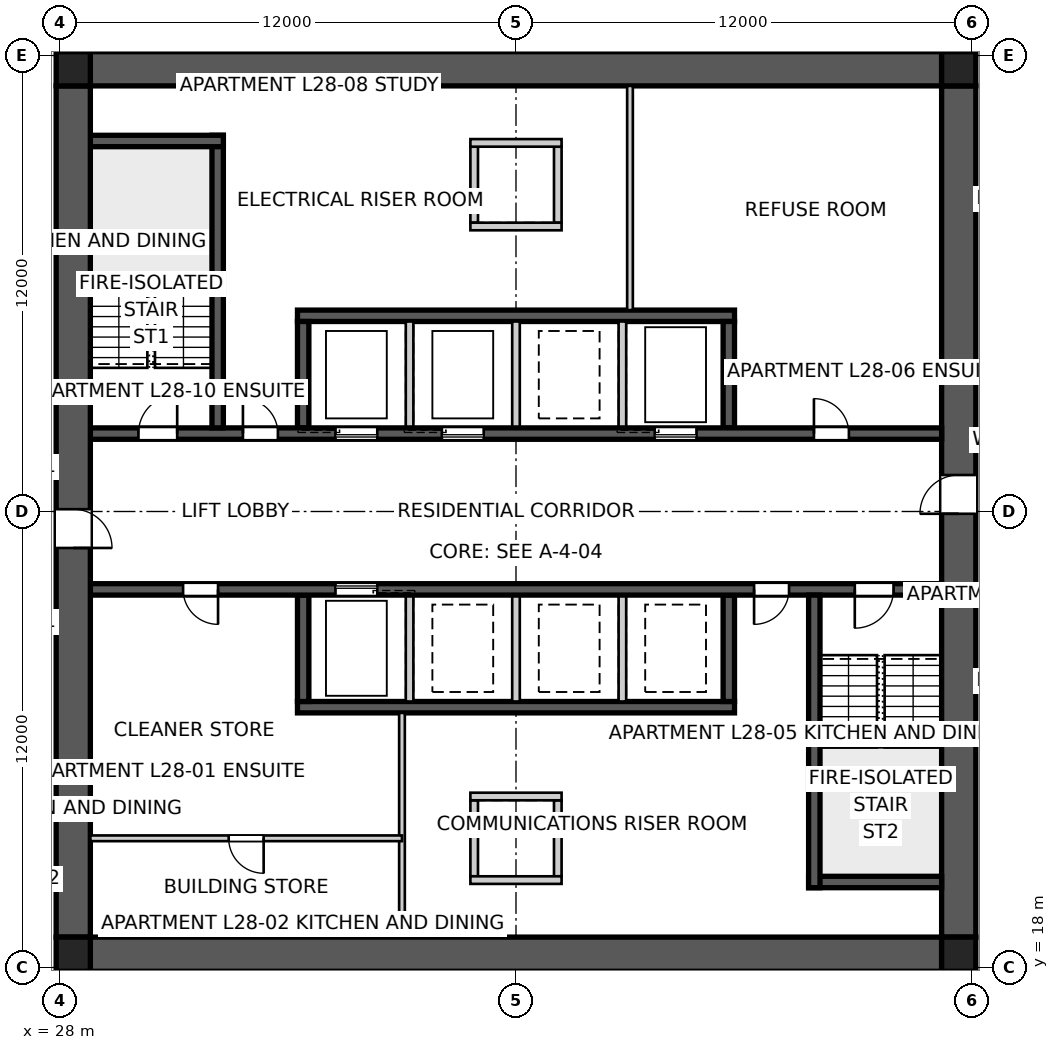
"""IFC4 building model, lengths in metres.
Left out: names, types, materials, properties, quantities, classifications, styles, units other than length and angle.
Written with IfcOpenShell. Run it as: python <this file> out.ifc"""

import sys

from ifc_helpers import new_model, si_unit, direction, frame, frame_2d, origin, origin_2d, place, context, subcontext, project, spatial, polyline, rectangle, outline, extrude, element, fill, save


model = new_model("IFC4")
c1 = context("Model", 3, precision=1e-05, world=origin(), true_north=direction((0.0, 1.0)))
c2 = subcontext(c1, "Body", "Model", "MODEL_VIEW")
j1 = project(units=[si_unit("LENGTHUNIT", "METRE"), si_unit("PLANEANGLEUNIT", "RADIAN")], contexts=[c1])
p1 = place(None, origin())
s1 = spatial("IfcSite", under=j1, at=p1, CompositionType="ELEMENT")
p2 = place(p1, origin())
s2 = spatial("IfcBuilding", under=s1, at=p2, CompositionType="ELEMENT")
p3 = place(p2, frame((0.0, 0.0, 103.2)))
s3 = spatial("IfcBuildingStorey", under=s2, at=p3, CompositionType="ELEMENT", Elevation=103.2)
for number, where, z_axis, x_axis in (
    (1, (28.8, 41.65, 0.0), (0.0, 0.0, 1.0), (1.0, 0.0, 0.0)),
    (2, (51.2, 18.35, 0.0), (0.0, 0.0, 1.0), (-1.0, 0.0, 0.0)),
):
    element("IfcWall", number, at=place(p3, frame(where, z_axis=z_axis, x_axis=x_axis)), inside=s3, PredefinedType="SHEAR", context=c2, shape_type="SweptSolid", body=[
        extrude(outline(polyline([(0.0, -0.45), (22.4, -0.45), (22.4, -0.025), (22.85, -0.025), (22.85, 0.025), (22.4, 0.025), (22.4, 0.45), (0.0, 0.45), (0.0, 0.025), (-0.45, 0.025), (-0.45, -0.025), (0.0, -0.025), (0.0, -0.45)])), origin(), (0.0, 0.0, 1.0), 3.4),
    ])
p4 = place(p3, frame((51.65, 18.8, 0.0), z_axis=(0.0, 0.0, 1.0), x_axis=(0.0, 1.0, 0.0)))
e3 = element("IfcWall", 3, at=p4, inside=s3, PredefinedType="SHEAR", context=c2, shape_type="SweptSolid", body=[
    extrude(outline(polyline([(0.0, -0.45), (22.4, -0.45), (22.4, -0.025), (22.85, -0.025), (22.85, 0.025), (22.4, 0.025), (22.4, 0.45), (0.0, 0.45), (0.0, 0.025), (-0.45, 0.025), (-0.45, -0.025), (0.0, -0.025), (0.0, -0.45)])), origin(), (0.0, 0.0, 1.0), 3.4),
])
p5 = place(p4, frame((11.14, 0.0, 0.0)))
e4 = element("IfcOpeningElement", 4, at=p5, cuts=e3, PredefinedType="OPENING", context=c2, shape_type="SweptSolid", body=[
    extrude(rectangle(XDim=1.02, YDim=2.4, at=frame_2d((0.51, 1.2))), frame((0.0, 0.46, 0.0), z_axis=(0.0, -1.0, 0.0), x_axis=(1.0, 0.0, 0.0)), (0.0, 0.0, 1.0), 0.92),
])
p6 = place(p3, frame((28.35, 41.2, 0.0), z_axis=(0.0, 0.0, 1.0), x_axis=(0.0, -1.0, 0.0)))
e5 = element("IfcWall", 5, at=p6, inside=s3, PredefinedType="SHEAR", context=c2, shape_type="SweptSolid", body=[
    extrude(outline(polyline([(0.0, -0.45), (22.4, -0.45), (22.4, -0.025), (22.85, -0.025), (22.85, 0.025), (22.4, 0.025), (22.4, 0.45), (0.0, 0.45), (0.0, 0.025), (-0.45, 0.025), (-0.45, -0.025), (0.0, -0.025), (0.0, -0.45)])), origin(), (0.0, 0.0, 1.0), 3.4),
])
p7 = place(p6, frame((11.14, 0.0, 0.0)))
e6 = element("IfcOpeningElement", 6, at=p7, cuts=e5, PredefinedType="OPENING", context=c2, shape_type="SweptSolid", body=[
    extrude(rectangle(XDim=1.02, YDim=2.4, at=frame_2d((0.51, 1.2))), frame((0.0, 0.46, 0.0), z_axis=(0.0, -1.0, 0.0), x_axis=(1.0, 0.0, 0.0)), (0.0, 0.0, 1.0), 0.92),
])
p8 = place(p3, frame((28.8, 32.05, 0.0), z_axis=(0.0, 0.0, 1.0), x_axis=(1.0, 0.0, 0.0)))
e7 = element("IfcWall", 7, at=p8, inside=s3, PredefinedType="SHEAR", context=c2, shape_type="SweptSolid", body=[
    extrude(rectangle(XDim=22.4, YDim=0.3, at=frame_2d((11.2, 0.0))), origin(), (0.0, 0.0, 1.0), 3.4),
])
p9 = place(p8, frame((19.04, 0.0, 0.0)))
e8 = element("IfcOpeningElement", 8, at=p9, cuts=e7, PredefinedType="OPENING", context=c2, shape_type="SweptSolid", body=[
    extrude(rectangle(XDim=0.92, YDim=2.1, at=frame_2d((0.46, 1.05))), frame((0.0, 0.16, 0.0), z_axis=(0.0, -1.0, 0.0), x_axis=(1.0, 0.0, 0.0)), (0.0, 0.0, 1.0), 0.32),
])
p10 = place(p8, frame((1.265, 0.0, 0.0)))
e9 = element("IfcOpeningElement", 9, at=p10, cuts=e7, PredefinedType="OPENING", context=c2, shape_type="SweptSolid", body=[
    extrude(rectangle(XDim=1.02, YDim=2.1, at=frame_2d((0.51, 1.05))), frame((0.0, 0.16, 0.0), z_axis=(0.0, -1.0, 0.0), x_axis=(1.0, 0.0, 0.0)), (0.0, 0.0, 1.0), 0.32),
])
p11 = place(p8, frame((4.015, 0.0, 0.0)))
e10 = element("IfcOpeningElement", 10, at=p11, cuts=e7, PredefinedType="OPENING", context=c2, shape_type="SweptSolid", body=[
    extrude(rectangle(XDim=0.92, YDim=2.1, at=frame_2d((0.46, 1.05))), frame((0.0, 0.16, 0.0), z_axis=(0.0, -1.0, 0.0), x_axis=(1.0, 0.0, 0.0)), (0.0, 0.0, 1.0), 0.32),
])
p12 = place(p8, frame((6.45, 0.0, 0.0)))
e11 = element("IfcOpeningElement", 11, at=p12, cuts=e7, PredefinedType="OPENING", context=c2, shape_type="SweptSolid", body=[
    extrude(rectangle(XDim=1.1, YDim=2.1, at=frame_2d((0.55, 1.05))), frame((0.0, 0.16, 0.0), z_axis=(0.0, -1.0, 0.0), x_axis=(1.0, 0.0, 0.0)), (0.0, 0.0, 1.0), 0.32),
])
p13 = place(p8, frame((9.25, 0.0, 0.0)))
e12 = element("IfcOpeningElement", 12, at=p13, cuts=e7, PredefinedType="OPENING", context=c2, shape_type="SweptSolid", body=[
    extrude(rectangle(XDim=1.1, YDim=2.1, at=frame_2d((0.55, 1.05))), frame((0.0, 0.16, 0.0), z_axis=(0.0, -1.0, 0.0), x_axis=(1.0, 0.0, 0.0)), (0.0, 0.0, 1.0), 0.32),
])
p14 = place(p8, frame((14.85, 0.0, 0.0)))
e13 = element("IfcOpeningElement", 13, at=p14, cuts=e7, PredefinedType="OPENING", context=c2, shape_type="SweptSolid", body=[
    extrude(rectangle(XDim=1.1, YDim=2.1, at=frame_2d((0.55, 1.05))), frame((0.0, 0.16, 0.0), z_axis=(0.0, -1.0, 0.0), x_axis=(1.0, 0.0, 0.0)), (0.0, 0.0, 1.0), 0.32),
])
p15 = place(p3, frame((51.2, 27.95, 0.0), z_axis=(0.0, 0.0, 1.0), x_axis=(-1.0, 0.0, 0.0)))
e14 = element("IfcWall", 14, at=p15, inside=s3, PredefinedType="SHEAR", context=c2, shape_type="SweptSolid", body=[
    extrude(rectangle(XDim=22.4, YDim=0.3, at=frame_2d((11.2, 0.0))), origin(), (0.0, 0.0, 1.0), 3.4),
])
p16 = place(p15, frame((19.04, 0.0, 0.0)))
e15 = element("IfcOpeningElement", 15, at=p16, cuts=e14, PredefinedType="OPENING", context=c2, shape_type="SweptSolid", body=[
    extrude(rectangle(XDim=0.92, YDim=2.1, at=frame_2d((0.46, 1.05))), frame((0.0, 0.16, 0.0), z_axis=(0.0, -1.0, 0.0), x_axis=(1.0, 0.0, 0.0)), (0.0, 0.0, 1.0), 0.32),
])
p17 = place(p15, frame((1.265, 0.0, 0.0)))
e16 = element("IfcOpeningElement", 16, at=p17, cuts=e14, PredefinedType="OPENING", context=c2, shape_type="SweptSolid", body=[
    extrude(rectangle(XDim=1.02, YDim=2.1, at=frame_2d((0.51, 1.05))), frame((0.0, 0.16, 0.0), z_axis=(0.0, -1.0, 0.0), x_axis=(1.0, 0.0, 0.0)), (0.0, 0.0, 1.0), 0.32),
])
p18 = place(p15, frame((4.015, 0.0, 0.0)))
e17 = element("IfcOpeningElement", 17, at=p18, cuts=e14, PredefinedType="OPENING", context=c2, shape_type="SweptSolid", body=[
    extrude(rectangle(XDim=0.92, YDim=2.1, at=frame_2d((0.46, 1.05))), frame((0.0, 0.16, 0.0), z_axis=(0.0, -1.0, 0.0), x_axis=(1.0, 0.0, 0.0)), (0.0, 0.0, 1.0), 0.32),
])
p19 = place(p15, frame((14.85, 0.0, 0.0)))
e18 = element("IfcOpeningElement", 18, at=p19, cuts=e14, PredefinedType="OPENING", context=c2, shape_type="SweptSolid", body=[
    extrude(rectangle(XDim=1.1, YDim=2.1, at=frame_2d((0.55, 1.05))), frame((0.0, 0.16, 0.0), z_axis=(0.0, -1.0, 0.0), x_axis=(1.0, 0.0, 0.0)), (0.0, 0.0, 1.0), 0.32),
])
for number, where, z_axis, x_axis in (
    (19, (34.25, 35.15, 0.0), (0.0, 0.0, 1.0), (1.0, 0.0, 0.0)),
    (20, (45.75, 24.85, 0.0), (0.0, 0.0, 1.0), (-1.0, 0.0, 0.0)),
):
    element("IfcWall", number, at=place(p3, frame(where, z_axis=z_axis, x_axis=x_axis)), inside=s3, PredefinedType="SHEAR", context=c2, shape_type="SweptSolid", body=[
        extrude(rectangle(XDim=11.5, YDim=0.3, at=frame_2d((5.75, 0.0))), origin(), (0.0, 0.0, 1.0), 3.4),
    ])
for number, where, z_axis, x_axis in (
    (21, (34.4, 32.2, 0.0), (0.0, 0.0, 1.0), (0.0, 1.0, 0.0)),
    (22, (45.6, 27.8, 0.0), (0.0, 0.0, 1.0), (0.0, -1.0, 0.0)),
):
    element("IfcWall", number, at=place(p3, frame(where, z_axis=z_axis, x_axis=x_axis)), inside=s3, PredefinedType="SHEAR", context=c2, shape_type="SweptSolid", body=[
        extrude(rectangle(XDim=2.8, YDim=0.3, at=frame_2d((1.4, 0.0))), origin(), (0.0, 0.0, 1.0), 3.4),
    ])
for number, where, z_axis, x_axis in (
    (23, (37.2, 32.2, 0.0), (0.0, 0.0, 1.0), (0.0, 1.0, 0.0)),
    (24, (42.8, 27.8, 0.0), (0.0, 0.0, 1.0), (0.0, -1.0, 0.0)),
    (25, (40.0, 32.2, 0.0), (0.0, 0.0, 1.0), (0.0, 1.0, 0.0)),
    (26, (40.0, 27.8, 0.0), (0.0, 0.0, 1.0), (0.0, -1.0, 0.0)),
    (27, (42.8, 32.2, 0.0), (0.0, 0.0, 1.0), (0.0, 1.0, 0.0)),
    (28, (37.2, 27.8, 0.0), (0.0, 0.0, 1.0), (0.0, -1.0, 0.0)),
):
    element("IfcWall", number, at=place(p3, frame(where, z_axis=z_axis, x_axis=x_axis)), inside=s3, PredefinedType="SOLIDWALL", context=c2, shape_type="SweptSolid", body=[
        extrude(rectangle(XDim=2.8, YDim=0.2, at=frame_2d((1.4, 0.0))), origin(), (0.0, 0.0, 1.0), 3.4),
    ])
for number, where, z_axis, x_axis in (
    (29, (45.6, 32.2, 0.0), (0.0, 0.0, 1.0), (0.0, 1.0, 0.0)),
    (30, (34.4, 27.8, 0.0), (0.0, 0.0, 1.0), (0.0, -1.0, 0.0)),
):
    element("IfcWall", number, at=place(p3, frame(where, z_axis=z_axis, x_axis=x_axis)), inside=s3, PredefinedType="SHEAR", context=c2, shape_type="SweptSolid", body=[
        extrude(rectangle(XDim=2.8, YDim=0.3, at=frame_2d((1.4, 0.0))), origin(), (0.0, 0.0, 1.0), 3.4),
    ])
p20 = place(p3, frame((32.15, 32.2, 0.0), z_axis=(0.0, 0.0, 1.0), x_axis=(0.0, 1.0, 0.0)))
e31 = element("IfcWall", 31, at=p20, inside=s3, PredefinedType="SHEAR", context=c2, shape_type="SweptSolid", body=[
    extrude(rectangle(XDim=7.7, YDim=0.3, at=frame_2d((3.85, 0.0))), origin(), (0.0, 0.0, 1.0), 3.4),
])
p21 = place(p3, frame((28.8, 39.75, 0.0), z_axis=(0.0, 0.0, 1.0), x_axis=(1.0, 0.0, 0.0)))
e32 = element("IfcWall", 32, at=p21, inside=s3, PredefinedType="SHEAR", context=c2, shape_type="SweptSolid", body=[
    extrude(rectangle(XDim=3.5, YDim=0.3, at=frame_2d((1.75, 0.0))), origin(), (0.0, 0.0, 1.0), 3.4),
])
p22 = place(p3, frame((47.85, 27.8, 0.0), z_axis=(0.0, 0.0, 1.0), x_axis=(0.0, -1.0, 0.0)))
e33 = element("IfcWall", 33, at=p22, inside=s3, PredefinedType="SHEAR", context=c2, shape_type="SweptSolid", body=[
    extrude(rectangle(XDim=7.7, YDim=0.3, at=frame_2d((3.85, 0.0))), origin(), (0.0, 0.0, 1.0), 3.4),
])
p23 = place(p3, frame((51.2, 20.25, 0.0), z_axis=(0.0, 0.0, 1.0), x_axis=(-1.0, 0.0, 0.0)))
e34 = element("IfcWall", 34, at=p23, inside=s3, PredefinedType="SHEAR", context=c2, shape_type="SweptSolid", body=[
    extrude(rectangle(XDim=3.5, YDim=0.3, at=frame_2d((1.75, 0.0))), origin(), (0.0, 0.0, 1.0), 3.4),
])
for number, where, z_axis, x_axis in (
    (35, (38.9, 37.6, 0.0), (0.0, 0.0, 1.0), (0.0, 1.0, 0.0)),
    (36, (41.1, 37.6, 0.0), (0.0, 0.0, 1.0), (0.0, 1.0, 0.0)),
):
    element("IfcWall", number, at=place(p3, frame(where, z_axis=z_axis, x_axis=x_axis)), inside=s3, PredefinedType="SOLIDWALL", context=c2, shape_type="SweptSolid", body=[
        extrude(rectangle(XDim=2.0, YDim=0.2, at=frame_2d((1.0, 0.0))), origin(), (0.0, 0.0, 1.0), 3.4),
    ])
for number, where, z_axis, x_axis in (
    (37, (38.8, 37.5, 0.0), (0.0, 0.0, 1.0), (1.0, 0.0, 0.0)),
    (38, (38.8, 39.7, 0.0), (0.0, 0.0, 1.0), (1.0, 0.0, 0.0)),
):
    element("IfcWall", number, at=place(p3, frame(where, z_axis=z_axis, x_axis=x_axis)), inside=s3, PredefinedType="SOLIDWALL", context=c2, shape_type="SweptSolid", body=[
        extrude(rectangle(XDim=2.4, YDim=0.2, at=frame_2d((1.2, 0.0))), origin(), (0.0, 0.0, 1.0), 3.4),
    ])
for number, where, z_axis, x_axis in (
    (39, (38.9, 22.4, 0.0), (0.0, 0.0, 1.0), (0.0, -1.0, 0.0)),
    (40, (41.1, 22.4, 0.0), (0.0, 0.0, 1.0), (0.0, -1.0, 0.0)),
):
    element("IfcWall", number, at=place(p3, frame(where, z_axis=z_axis, x_axis=x_axis)), inside=s3, PredefinedType="SOLIDWALL", context=c2, shape_type="SweptSolid", body=[
        extrude(rectangle(XDim=2.0, YDim=0.2, at=frame_2d((1.0, 0.0))), origin(), (0.0, 0.0, 1.0), 3.4),
    ])
for number, where, z_axis, x_axis in (
    (41, (38.8, 22.5, 0.0), (0.0, 0.0, 1.0), (1.0, 0.0, 0.0)),
    (42, (38.8, 20.3, 0.0), (0.0, 0.0, 1.0), (1.0, 0.0, 0.0)),
):
    element("IfcWall", number, at=place(p3, frame(where, z_axis=z_axis, x_axis=x_axis)), inside=s3, PredefinedType="SOLIDWALL", context=c2, shape_type="SweptSolid", body=[
        extrude(rectangle(XDim=2.4, YDim=0.2, at=frame_2d((1.2, 0.0))), origin(), (0.0, 0.0, 1.0), 3.4),
    ])
for number, where, z_axis, x_axis in (
    (43, (28.35, 18.35, 0.0), (0.0, 0.0, 1.0), (1.0, 0.0, 0.0)),
    (44, (51.65, 18.35, 0.0), (0.0, 0.0, 1.0), (1.0, 0.0, 0.0)),
    (45, (51.65, 41.65, 0.0), (0.0, 0.0, 1.0), (1.0, 0.0, 0.0)),
    (46, (28.35, 41.65, 0.0), (0.0, 0.0, 1.0), (1.0, 0.0, 0.0)),
):
    element("IfcColumn", number, at=place(p3, frame(where, z_axis=z_axis, x_axis=x_axis)), inside=s3, PredefinedType="COLUMN", context=c2, shape_type="SweptSolid", body=[
        extrude(rectangle(XDim=0.9, YDim=0.9, at=origin_2d()), origin(), (0.0, 0.0, 1.0), 3.4),
    ])
for number, where, z_axis, x_axis in (
    (47, (43.0, 41.2, 0.0), (0.0, 0.0, 1.0), (0.0, -1.0, 0.0)),
    (48, (37.0, 18.8, 0.0), (0.0, 0.0, 1.0), (0.0, 1.0, 0.0)),
):
    element("IfcWall", number, at=place(p3, frame(where, z_axis=z_axis, x_axis=x_axis)), inside=s3, PredefinedType="SOLIDWALL", context=c2, shape_type="SweptSolid", body=[
        extrude(rectangle(XDim=5.9, YDim=0.15, at=frame_2d((2.95, 0.0))), origin(), (0.0, 0.0, 1.0), 3.2),
    ])
p24 = place(p3, frame((37.0, 21.4, 0.0), z_axis=(0.0, 0.0, 1.0), x_axis=(-1.0, 0.0, 0.0)))
e49 = element("IfcWall", 49, at=p24, inside=s3, PredefinedType="SOLIDWALL", context=c2, shape_type="SweptSolid", body=[
    extrude(rectangle(XDim=8.2, YDim=0.15, at=frame_2d((4.1, 0.0))), origin(), (0.0, 0.0, 1.0), 3.2),
])
p25 = place(p24, frame((3.64, 0.0, 0.0)))
e50 = element("IfcOpeningElement", 50, at=p25, cuts=e49, PredefinedType="OPENING", context=c2, shape_type="SweptSolid", body=[
    extrude(rectangle(XDim=0.92, YDim=2.1, at=frame_2d((0.46, 1.05))), frame((0.0, 0.085, 0.0), z_axis=(0.0, -1.0, 0.0), x_axis=(1.0, 0.0, 0.0)), (0.0, 0.0, 1.0), 0.17),
])
p26 = place(p9, origin())
e51 = element("IfcDoor", 51, at=p26, inside=s3, OperationType="SINGLE_SWING_LEFT", PredefinedType="DOOR", context=c2, shape_type="SweptSolid", body=[
    extrude(rectangle(XDim=0.92, YDim=2.1, at=frame_2d((0.46, 1.05))), frame((0.0, 0.025, 0.0), z_axis=(0.0, -1.0, 0.0), x_axis=(1.0, 0.0, 0.0)), (0.0, 0.0, 1.0), 0.05),
])
fill(e8, e51)
p27 = place(p16, origin())
e52 = element("IfcDoor", 52, at=p27, inside=s3, OperationType="SINGLE_SWING_LEFT", PredefinedType="DOOR", context=c2, shape_type="SweptSolid", body=[
    extrude(rectangle(XDim=0.92, YDim=2.1, at=frame_2d((0.46, 1.05))), frame((0.0, 0.025, 0.0), z_axis=(0.0, -1.0, 0.0), x_axis=(1.0, 0.0, 0.0)), (0.0, 0.0, 1.0), 0.05),
])
fill(e15, e52)
p28 = place(p17, origin())
e53 = element("IfcDoor", 53, at=p28, inside=s3, OperationType="SINGLE_SWING_RIGHT", PredefinedType="DOOR", context=c2, shape_type="SweptSolid", body=[
    extrude(rectangle(XDim=1.02, YDim=2.1, at=frame_2d((0.51, 1.05))), frame((0.0, 0.025, 0.0), z_axis=(0.0, -1.0, 0.0), x_axis=(1.0, 0.0, 0.0)), (0.0, 0.0, 1.0), 0.05),
])
fill(e16, e53)
p29 = place(p10, origin())
e54 = element("IfcDoor", 54, at=p29, inside=s3, OperationType="SINGLE_SWING_RIGHT", PredefinedType="DOOR", context=c2, shape_type="SweptSolid", body=[
    extrude(rectangle(XDim=1.02, YDim=2.1, at=frame_2d((0.51, 1.05))), frame((0.0, 0.025, 0.0), z_axis=(0.0, -1.0, 0.0), x_axis=(1.0, 0.0, 0.0)), (0.0, 0.0, 1.0), 0.05),
])
fill(e9, e54)
p30 = place(p11, origin())
e55 = element("IfcDoor", 55, at=p30, inside=s3, OperationType="SINGLE_SWING_LEFT", PredefinedType="DOOR", context=c2, shape_type="SweptSolid", body=[
    extrude(rectangle(XDim=0.92, YDim=2.1, at=frame_2d((0.46, 1.05))), frame((0.0, 0.025, 0.0), z_axis=(0.0, -1.0, 0.0), x_axis=(1.0, 0.0, 0.0)), (0.0, 0.0, 1.0), 0.05),
])
fill(e10, e55)
p31 = place(p18, origin())
e56 = element("IfcDoor", 56, at=p31, inside=s3, OperationType="SINGLE_SWING_RIGHT", PredefinedType="DOOR", context=c2, shape_type="SweptSolid", body=[
    extrude(rectangle(XDim=0.92, YDim=2.1, at=frame_2d((0.46, 1.05))), frame((0.0, 0.025, 0.0), z_axis=(0.0, -1.0, 0.0), x_axis=(1.0, 0.0, 0.0)), (0.0, 0.0, 1.0), 0.05),
])
fill(e17, e56)
p32 = place(p25, origin())
e57 = element("IfcDoor", 57, at=p32, inside=s3, OperationType="SINGLE_SWING_LEFT", PredefinedType="DOOR", context=c2, shape_type="SweptSolid", body=[
    extrude(rectangle(XDim=0.92, YDim=2.1, at=frame_2d((0.46, 1.05))), frame((0.0, 0.025, 0.0), z_axis=(0.0, -1.0, 0.0), x_axis=(1.0, 0.0, 0.0)), (0.0, 0.0, 1.0), 0.05),
])
fill(e50, e57)
p33 = place(p5, origin())
e58 = element("IfcDoor", 58, at=p33, inside=s3, OperationType="SINGLE_SWING_LEFT", PredefinedType="DOOR", context=c2, shape_type="SweptSolid", body=[
    extrude(rectangle(XDim=1.02, YDim=2.4, at=frame_2d((0.51, 1.2))), frame((0.0, 0.025, 0.0), z_axis=(0.0, -1.0, 0.0), x_axis=(1.0, 0.0, 0.0)), (0.0, 0.0, 1.0), 0.05),
])
fill(e4, e58)
p34 = place(p7, origin())
e59 = element("IfcDoor", 59, at=p34, inside=s3, OperationType="SINGLE_SWING_RIGHT", PredefinedType="DOOR", context=c2, shape_type="SweptSolid", body=[
    extrude(rectangle(XDim=1.02, YDim=2.4, at=frame_2d((0.51, 1.2))), frame((0.0, 0.025, 0.0), z_axis=(0.0, -1.0, 0.0), x_axis=(1.0, 0.0, 0.0)), (0.0, 0.0, 1.0), 0.05),
])
fill(e6, e59)
p35 = place(p12, origin())
e60 = element("IfcDoor", 60, at=p35, inside=s3, OperationType="SLIDING_TO_LEFT", PredefinedType="DOOR", context=c2, shape_type="SweptSolid", body=[
    extrude(rectangle(XDim=1.1, YDim=2.1, at=frame_2d((0.55, 1.05))), frame((0.0, 0.025, 0.0), z_axis=(0.0, -1.0, 0.0), x_axis=(1.0, 0.0, 0.0)), (0.0, 0.0, 1.0), 0.05),
])
fill(e11, e60)
p36 = place(p13, origin())
e61 = element("IfcDoor", 61, at=p36, inside=s3, OperationType="SLIDING_TO_LEFT", PredefinedType="DOOR", context=c2, shape_type="SweptSolid", body=[
    extrude(rectangle(XDim=1.1, YDim=2.1, at=frame_2d((0.55, 1.05))), frame((0.0, 0.025, 0.0), z_axis=(0.0, -1.0, 0.0), x_axis=(1.0, 0.0, 0.0)), (0.0, 0.0, 1.0), 0.05),
])
fill(e12, e61)
p37 = place(p14, origin())
e62 = element("IfcDoor", 62, at=p37, inside=s3, OperationType="SLIDING_TO_LEFT", PredefinedType="DOOR", context=c2, shape_type="SweptSolid", body=[
    extrude(rectangle(XDim=1.1, YDim=2.1, at=frame_2d((0.55, 1.05))), frame((0.0, 0.025, 0.0), z_axis=(0.0, -1.0, 0.0), x_axis=(1.0, 0.0, 0.0)), (0.0, 0.0, 1.0), 0.05),
])
fill(e13, e62)
p38 = place(p19, origin())
e63 = element("IfcDoor", 63, at=p38, inside=s3, OperationType="SLIDING_TO_LEFT", PredefinedType="DOOR", context=c2, shape_type="SweptSolid", body=[
    extrude(rectangle(XDim=1.1, YDim=2.1, at=frame_2d((0.55, 1.05))), frame((0.0, 0.025, 0.0), z_axis=(0.0, -1.0, 0.0), x_axis=(1.0, 0.0, 0.0)), (0.0, 0.0, 1.0), 0.05),
])
fill(e18, e63)
save(model, sys.argv[1])
